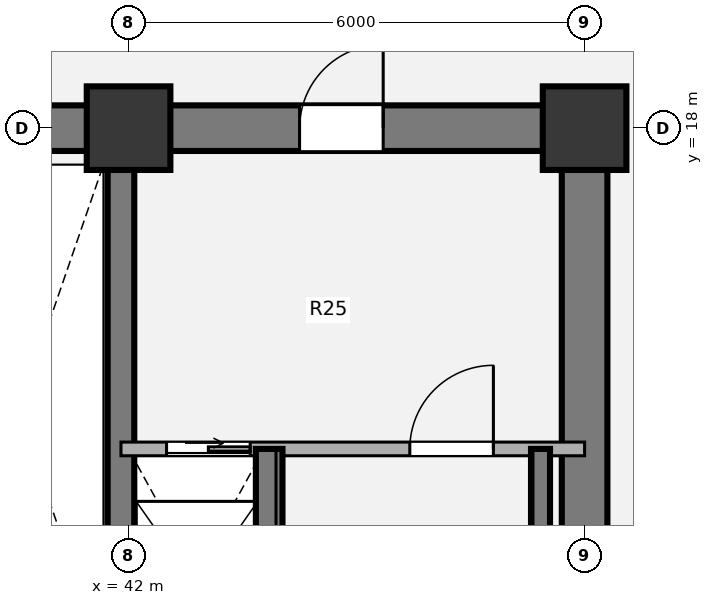
"""IFC4 building model, lengths in metres.
Left out: names, types, materials, properties, quantities, classifications, styles, units other than length and angle.
Written with IfcOpenShell. Run it as: python <this file> out.ifc"""

import sys

from ifc_helpers import new_model, si_unit, direction, frame, frame_2d, origin, origin_2d, place, context, subcontext, project, spatial, rectangle, extrude, source, transform, mapped, element, fill, save


model = new_model("IFC4")
c1 = context("Model", 3, precision=1e-05, world=origin(), true_north=direction((0.0, 1.0)))
c2 = subcontext(c1, "Body", "Model", "MODEL_VIEW")
j1 = project(units=[si_unit("LENGTHUNIT", "METRE"), si_unit("PLANEANGLEUNIT", "RADIAN")], contexts=[c1])
p1 = place(None, origin())
s1 = spatial("IfcSite", under=j1, at=p1, CompositionType="ELEMENT")
p2 = place(p1, origin())
s2 = spatial("IfcBuilding", under=s1, at=p2, CompositionType="ELEMENT")
p3 = place(p2, frame((0.0, 0.0, 38.34)))
s3 = spatial("IfcBuildingStorey", under=s2, at=p3, CompositionType="ELEMENT", Elevation=38.34)
m1 = source(origin(), c2, "Body", "SweptSolid", [
    extrude(rectangle(XDim=1.1, YDim=1.1, at=origin_2d()), origin(), (0.0, 0.0, 1.0), 3.78),
])
for number, where, z_axis, x_axis in (
    (1, (42.0, 18.0, 0.0), (0.0, 0.0, 1.0), (1.0, 0.0, 0.0)),
    (2, (48.0, 18.0, 0.0), (0.0, 0.0, 1.0), (1.0, 0.0, 0.0)),
):
    element("IfcColumn", number, at=place(p3, frame(where, z_axis=z_axis, x_axis=x_axis)), inside=s3, PredefinedType="COLUMN", context=c2, shape_type="MappedRepresentation", body=[
        mapped(m1, transform((0.0, 0.0, 0.0), x_axis=(1.0, 0.0, 0.0), y_axis=(0.0, 1.0, 0.0), z_axis=(0.0, 0.0, 1.0), scale=1.0)),
    ])
p4 = place(p3, frame((48.0, 18.0, 0.0), z_axis=(0.0, 0.0, 1.0), x_axis=(0.0, -1.0, 0.0)))
e3 = element("IfcWall", 3, at=p4, inside=s3, PredefinedType="SHEAR", context=c2, shape_type="SweptSolid", body=[
    extrude(rectangle(XDim=12.0, YDim=0.6, at=frame_2d((6.0, 0.0))), origin(), (0.0, 0.0, 1.0), 3.78),
])
p5 = place(p3, frame((38.8, 18.0, 0.0), z_axis=(0.0, 0.0, 1.0), x_axis=(1.0, 0.0, 0.0)))
e4 = element("IfcWall", 4, at=p5, inside=s3, PredefinedType="SHEAR", context=c2, shape_type="SweptSolid", body=[
    extrude(rectangle(XDim=9.5, YDim=0.6, at=frame_2d((4.75, 0.0))), origin(), (0.0, 0.0, 1.0), 3.78),
])
p6 = place(p5, frame((5.45, 0.0, 0.0)))
e5 = element("IfcOpeningElement", 5, at=p6, cuts=e4, PredefinedType="OPENING", context=c2, shape_type="SweptSolid", body=[
    extrude(rectangle(XDim=1.1, YDim=2.1, at=origin_2d()), frame((0.55, 0.31, 1.05), z_axis=(0.0, -1.0, 0.0), x_axis=(1.0, 0.0, 0.0)), (0.0, 0.0, 1.0), 0.62),
])
p7 = place(p3, frame((41.9, 18.0, 0.0), z_axis=(0.0, 0.0, 1.0), x_axis=(0.0, -1.0, 0.0)))
e6 = element("IfcWall", 6, at=p7, inside=s3, PredefinedType="SHEAR", context=c2, shape_type="SweptSolid", body=[
    extrude(rectangle(XDim=12.0, YDim=0.35, at=frame_2d((6.0, 0.0))), origin(), (0.0, 0.0, 1.0), 3.78),
])
p8 = place(p7, frame((10.08, 0.0, 0.0)))
e7 = element("IfcOpeningElement", 7, at=p8, cuts=e6, PredefinedType="OPENING", context=c2, shape_type="SweptSolid", body=[
    extrude(rectangle(XDim=1.3, YDim=2.1, at=origin_2d()), frame((0.65, 0.185, 1.05), z_axis=(0.0, -1.0, 0.0), x_axis=(1.0, 0.0, 0.0)), (0.0, 0.0, 1.0), 0.37),
])
p9 = place(p3, frame((41.9, 13.78, 0.0), z_axis=(0.0, 0.0, 1.0), x_axis=(1.0, 0.0, 0.0)))
e8 = element("IfcWall", 8, at=p9, inside=s3, PredefinedType="PARTITIONING", context=c2, shape_type="SweptSolid", body=[
    extrude(rectangle(XDim=6.1, YDim=0.18, at=frame_2d((3.05, 0.0))), origin(), (0.0, 0.0, 1.0), 3.5),
])
p10 = place(p9, frame((0.6, 0.0, 0.0)))
e9 = element("IfcOpeningElement", 9, at=p10, cuts=e8, PredefinedType="OPENING", context=c2, shape_type="SweptSolid", body=[
    extrude(rectangle(XDim=1.1, YDim=2.1, at=origin_2d()), frame((0.55, 0.1, 1.05), z_axis=(0.0, -1.0, 0.0), x_axis=(1.0, 0.0, 0.0)), (0.0, 0.0, 1.0), 0.2),
])
p11 = place(p9, frame((3.8, 0.0, 0.0)))
e10 = element("IfcOpeningElement", 10, at=p11, cuts=e8, PredefinedType="OPENING", context=c2, shape_type="SweptSolid", body=[
    extrude(rectangle(XDim=1.1, YDim=2.1, at=origin_2d()), frame((0.55, 0.1, 1.05), z_axis=(0.0, -1.0, 0.0), x_axis=(1.0, 0.0, 0.0)), (0.0, 0.0, 1.0), 0.2),
])
p12 = place(p3, frame((43.85, 6.0, 0.0), z_axis=(0.0, 0.0, 1.0), x_axis=(0.0, 1.0, 0.0)))
e11 = element("IfcWall", 11, at=p12, inside=s3, PredefinedType="SHEAR", context=c2, shape_type="SweptSolid", body=[
    extrude(rectangle(XDim=7.78, YDim=0.35, at=frame_2d((3.89, 0.0))), origin(), (0.0, 0.0, 1.0), 3.85),
])
p13 = place(p3, frame((47.42, 6.0, 0.0), z_axis=(0.0, 0.0, 1.0), x_axis=(0.0, 1.0, 0.0)))
e12 = element("IfcWall", 12, at=p13, inside=s3, PredefinedType="SHEAR", context=c2, shape_type="SweptSolid", body=[
    extrude(rectangle(XDim=7.78, YDim=0.25, at=frame_2d((3.89, 0.0))), origin(), (0.0, 0.0, 1.0), 3.85),
])
m2 = source(origin(), c2, "Body", "SweptSolid", [
    extrude(rectangle(XDim=1.1, YDim=2.1, at=origin_2d()), frame((0.55, 0.025, 1.05), z_axis=(0.0, -1.0, 0.0), x_axis=(1.0, 0.0, 0.0)), (0.0, 0.0, 1.0), 0.05),
])
p14 = place(p10, origin())
e13 = element("IfcDoor", 13, at=p14, inside=s3, OperationType="SLIDING_TO_RIGHT", PredefinedType="DOOR", context=c2, shape_type="MappedRepresentation", body=[
    mapped(m2, transform((0.0, 0.0, 0.0), x_axis=(1.0, 0.0, 0.0), y_axis=(0.0, 1.0, 0.0), z_axis=(0.0, 0.0, 1.0), scale=1.0)),
])
fill(e9, e13)
m3 = source(origin(), c2, "Body", "SweptSolid", [
    extrude(rectangle(XDim=1.1, YDim=2.1, at=origin_2d()), frame((0.55, 0.025, 1.05), z_axis=(0.0, -1.0, 0.0), x_axis=(1.0, 0.0, 0.0)), (0.0, 0.0, 1.0), 0.05),
])
p15 = place(p11, origin())
e14 = element("IfcDoor", 14, at=p15, inside=s3, OperationType="SINGLE_SWING_RIGHT", PredefinedType="DOOR", context=c2, shape_type="MappedRepresentation", body=[
    mapped(m3, transform((0.0, 0.0, 0.0), x_axis=(1.0, 0.0, 0.0), y_axis=(0.0, 1.0, 0.0), z_axis=(0.0, 0.0, 1.0), scale=1.0)),
])
fill(e10, e14)
m4 = source(origin(), c2, "Body", "SweptSolid", [
    extrude(rectangle(XDim=1.1, YDim=2.1, at=origin_2d()), frame((0.55, 0.025, 1.05), z_axis=(0.0, -1.0, 0.0), x_axis=(1.0, 0.0, 0.0)), (0.0, 0.0, 1.0), 0.05),
])
p16 = place(p6, origin())
e15 = element("IfcDoor", 15, at=p16, inside=s3, OperationType="SINGLE_SWING_RIGHT", PredefinedType="DOOR", context=c2, shape_type="MappedRepresentation", body=[
    mapped(m4, transform((0.0, 0.0, 0.0), x_axis=(1.0, 0.0, 0.0), y_axis=(0.0, 1.0, 0.0), z_axis=(0.0, 0.0, 1.0), scale=1.0)),
])
fill(e5, e15)
save(model, sys.argv[1])
